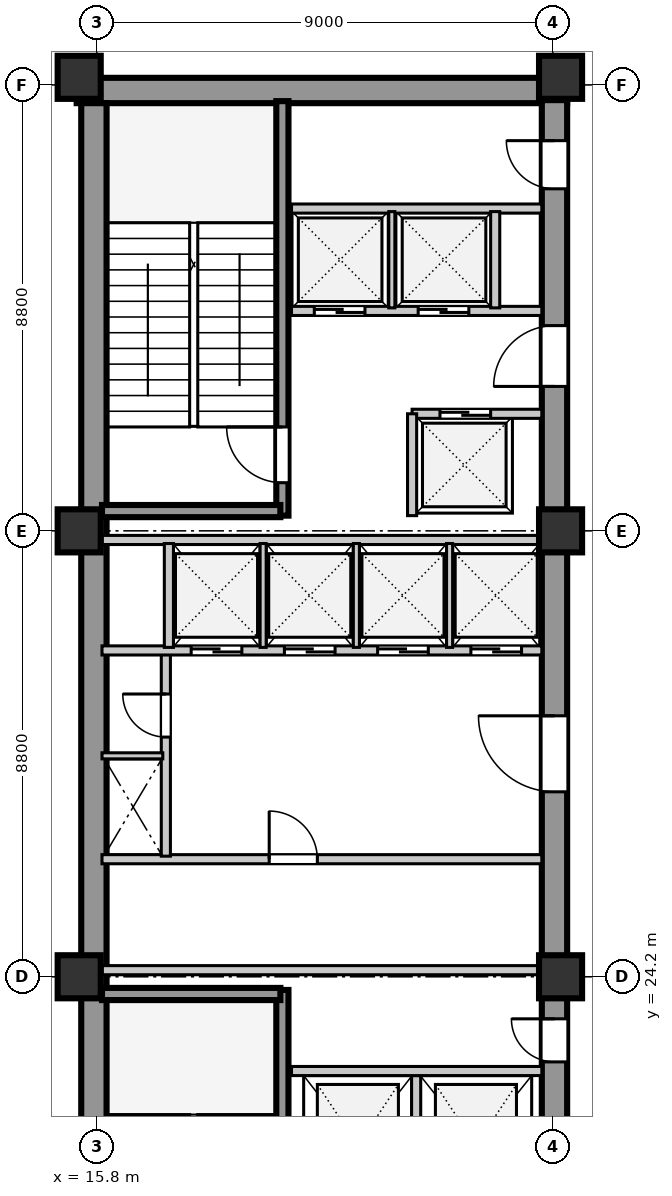
"""IFC4 building model, lengths in metres.
Left out: names, types, materials, properties, quantities, classifications, styles, units other than length and angle.
Written with IfcOpenShell. Run it as: python <this file> out.ifc"""

import sys

from ifc_helpers import new_model, si_unit, direction, frame, frame_2d, origin, origin_2d, place, context, subcontext, project, spatial, rectangle, extrude, element, fill, save


model = new_model("IFC4")
c1 = context("Model", 3, precision=1e-05, world=origin(), true_north=direction((0.0, 1.0)))
c2 = subcontext(c1, "Body", "Model", "MODEL_VIEW")
j1 = project(units=[si_unit("LENGTHUNIT", "METRE"), si_unit("PLANEANGLEUNIT", "RADIAN")], contexts=[c1])
p1 = place(None, origin())
s1 = spatial("IfcSite", under=j1, at=p1, CompositionType="ELEMENT")
p2 = place(p1, origin())
s2 = spatial("IfcBuilding", under=s1, at=p2, CompositionType="ELEMENT")
p3 = place(p2, frame((0.0, 0.0, 208.9)))
s3 = spatial("IfcBuildingStorey", under=s2, at=p3, CompositionType="ELEMENT", Elevation=208.9)
p4 = place(p3, frame((15.4, 41.69, 0.0), z_axis=(0.0, 0.0, 1.0), x_axis=(1.0, 0.0, 0.0)))
e1 = element("IfcWall", 1, at=p4, inside=s3, PredefinedType="SHEAR", context=c2, shape_type="SweptSolid", body=[
    extrude(rectangle(XDim=9.68, YDim=0.5, at=frame_2d((4.84, 0.0))), origin(), (0.0, 0.0, 1.0), 4.96),
])
p5 = place(p3, frame((15.74, 15.81, 0.0), z_axis=(0.0, 0.0, 1.0), x_axis=(0.0, 1.0, 0.0)))
e2 = element("IfcWall", 2, at=p5, inside=s3, PredefinedType="SHEAR", context=c2, shape_type="SweptSolid", body=[
    extrude(rectangle(XDim=25.63, YDim=0.5, at=frame_2d((12.815, 0.0))), origin(), (0.0, 0.0, 1.0), 4.96),
])
p6 = place(p3, frame((24.83, 15.74, 0.0), z_axis=(0.0, 0.0, 1.0), x_axis=(0.0, 1.0, 0.0)))
e3 = element("IfcWall", 3, at=p6, inside=s3, PredefinedType="SHEAR", context=c2, shape_type="SweptSolid", body=[
    extrude(rectangle(XDim=25.76, YDim=0.5, at=frame_2d((12.88, 0.0))), origin(), (0.0, 0.0, 1.0), 4.96),
])
p7 = place(p6, frame((1.61, 0.0, 0.0)))
e4 = element("IfcOpeningElement", 4, at=p7, cuts=e3, PredefinedType="OPENING", context=c2, shape_type="SweptSolid", body=[
    extrude(rectangle(XDim=1.2, YDim=2.1, at=frame_2d((0.6, 1.05))), frame((0.0, 0.26, 0.0), z_axis=(0.0, -1.0, 0.0), x_axis=(1.0, 0.0, 0.0)), (0.0, 0.0, 1.0), 0.52),
])
p8 = place(p6, frame((6.78, 0.0, 0.0)))
e5 = element("IfcOpeningElement", 5, at=p8, cuts=e3, PredefinedType="OPENING", context=c2, shape_type="SweptSolid", body=[
    extrude(rectangle(XDim=0.85, YDim=2.06, at=frame_2d((0.425, 1.03))), frame((0.0, 0.26, 0.0), z_axis=(0.0, -1.0, 0.0), x_axis=(1.0, 0.0, 0.0)), (0.0, 0.0, 1.0), 0.52),
])
p9 = place(p6, frame((12.11, 0.0, 0.0)))
e6 = element("IfcOpeningElement", 6, at=p9, cuts=e3, PredefinedType="OPENING", context=c2, shape_type="SweptSolid", body=[
    extrude(rectangle(XDim=1.5, YDim=2.12, at=frame_2d((0.75, 1.06))), frame((0.0, 0.26, 0.0), z_axis=(0.0, -1.0, 0.0), x_axis=(1.0, 0.0, 0.0)), (0.0, 0.0, 1.0), 0.52),
])
p10 = place(p6, frame((20.11, 0.0, 0.0)))
e7 = element("IfcOpeningElement", 7, at=p10, cuts=e3, PredefinedType="OPENING", context=c2, shape_type="SweptSolid", body=[
    extrude(rectangle(XDim=1.2, YDim=2.12, at=frame_2d((0.6, 1.06))), frame((0.0, 0.26, 0.0), z_axis=(0.0, -1.0, 0.0), x_axis=(1.0, 0.0, 0.0)), (0.0, 0.0, 1.0), 0.52),
])
p11 = place(p6, frame((24.01, 0.0, 0.0)))
e8 = element("IfcOpeningElement", 8, at=p11, cuts=e3, PredefinedType="OPENING", context=c2, shape_type="SweptSolid", body=[
    extrude(rectangle(XDim=0.95, YDim=2.1, at=frame_2d((0.475, 1.05))), frame((0.0, 0.26, 0.0), z_axis=(0.0, -1.0, 0.0), x_axis=(1.0, 0.0, 0.0)), (0.0, 0.0, 1.0), 0.52),
])
for number, where, z_axis, x_axis in (
    (9, (15.45, 24.2, 0.0), (0.0, 0.0, 1.0), (1.0, 0.0, 0.0)),
    (10, (15.45, 33.0, 0.0), (0.0, 0.0, 1.0), (1.0, 0.0, 0.0)),
    (11, (15.45, 41.95, 0.0), (0.0, 0.0, 1.0), (1.0, 0.0, 0.0)),
    (12, (24.95, 24.2, 0.0), (0.0, 0.0, 1.0), (1.0, 0.0, 0.0)),
    (13, (24.95, 33.0, 0.0), (0.0, 0.0, 1.0), (1.0, 0.0, 0.0)),
    (14, (24.95, 41.95, 0.0), (0.0, 0.0, 1.0), (1.0, 0.0, 0.0)),
):
    element("IfcColumn", number, at=place(p3, frame(where, z_axis=z_axis, x_axis=x_axis)), inside=s3, PredefinedType="COLUMN", context=c2, shape_type="SweptSolid", body=[
        extrude(rectangle(XDim=0.85, YDim=0.85, at=origin_2d()), origin(), (0.0, 0.0, 1.0), 4.96),
    ])
p12 = place(p3, frame((19.46, 15.74, 0.0), z_axis=(0.0, 0.0, 1.0), x_axis=(0.0, 1.0, 0.0)))
e15 = element("IfcWall", 15, at=p12, inside=s3, PredefinedType="SHEAR", context=c2, shape_type="SweptSolid", body=[
    extrude(rectangle(XDim=8.2, YDim=0.24, at=frame_2d((4.1, 0.0))), origin(), (0.0, 0.0, 1.0), 5.2),
])
p13 = place(p12, frame((0.45, 0.0, 0.0)))
e16 = element("IfcOpeningElement", 16, at=p13, cuts=e15, PredefinedType="OPENING", context=c2, shape_type="SweptSolid", body=[
    extrude(rectangle(XDim=1.1, YDim=2.1, at=frame_2d((0.55, 1.05))), frame((0.0, 0.13, 0.0), z_axis=(0.0, -1.0, 0.0), x_axis=(1.0, 0.0, 0.0)), (0.0, 0.0, 1.0), 0.26),
])
p14 = place(p3, frame((15.9, 23.86, 0.0), z_axis=(0.0, 0.0, 1.0), x_axis=(1.0, 0.0, 0.0)))
e17 = element("IfcWall", 17, at=p14, inside=s3, PredefinedType="SHEAR", context=c2, shape_type="SweptSolid", body=[
    extrude(rectangle(XDim=3.52, YDim=0.24, at=frame_2d((1.76, 0.0))), origin(), (0.0, 0.0, 1.0), 5.2),
])
p15 = place(p3, frame((22.1, 19.51, 0.0), z_axis=(0.0, 0.0, 1.0), x_axis=(0.0, 1.0, 0.0)))
e18 = element("IfcWall", 18, at=p15, inside=s3, PredefinedType="SOLIDWALL", context=c2, shape_type="SweptSolid", body=[
    extrude(rectangle(XDim=2.74, YDim=0.18, at=frame_2d((1.37, 0.0))), origin(), (0.0, 0.0, 1.0), 4.96),
])
p16 = place(p3, frame((19.64, 22.34, 0.0), z_axis=(0.0, 0.0, 1.0), x_axis=(1.0, 0.0, 0.0)))
e19 = element("IfcWall", 19, at=p16, inside=s3, PredefinedType="SOLIDWALL", context=c2, shape_type="SweptSolid", body=[
    extrude(rectangle(XDim=4.94, YDim=0.18, at=frame_2d((2.47, 0.0))), origin(), (0.0, 0.0, 1.0), 4.96),
])
p17 = place(p3, frame((15.9, 26.52, 0.0), z_axis=(0.0, 0.0, 1.0), x_axis=(1.0, 0.0, 0.0)))
e20 = element("IfcWall", 20, at=p17, inside=s3, PredefinedType="SOLIDWALL", context=c2, shape_type="SweptSolid", body=[
    extrude(rectangle(XDim=8.68, YDim=0.18, at=frame_2d((4.34, 0.0))), origin(), (0.0, 0.0, 1.0), 4.96),
])
p18 = place(p17, frame((3.3, 0.0, 0.0)))
e21 = element("IfcOpeningElement", 21, at=p18, cuts=e20, PredefinedType="OPENING", context=c2, shape_type="SweptSolid", body=[
    extrude(rectangle(XDim=0.95, YDim=2.1, at=frame_2d((0.475, 1.05))), frame((0.0, 0.1, 0.0), z_axis=(0.0, -1.0, 0.0), x_axis=(1.0, 0.0, 0.0)), (0.0, 0.0, 1.0), 0.2),
])
p19 = place(p3, frame((15.9, 24.33, 0.0), z_axis=(0.0, 0.0, 1.0), x_axis=(1.0, 0.0, 0.0)))
e22 = element("IfcWall", 22, at=p19, inside=s3, PredefinedType="SOLIDWALL", context=c2, shape_type="SweptSolid", body=[
    extrude(rectangle(XDim=8.68, YDim=0.18, at=frame_2d((4.34, 0.0))), origin(), (0.0, 0.0, 1.0), 4.31),
])
p20 = place(p3, frame((17.16, 26.58, 0.0), z_axis=(0.0, 0.0, 1.0), x_axis=(0.0, 1.0, 0.0)))
e23 = element("IfcWall", 23, at=p20, inside=s3, PredefinedType="SOLIDWALL", context=c2, shape_type="SweptSolid", body=[
    extrude(rectangle(XDim=4.02, YDim=0.18, at=frame_2d((2.01, 0.0))), origin(), (0.0, 0.0, 1.0), 4.96),
])
p21 = place(p20, frame((2.35, 0.0, 0.0)))
e24 = element("IfcOpeningElement", 24, at=p21, cuts=e23, PredefinedType="OPENING", context=c2, shape_type="SweptSolid", body=[
    extrude(rectangle(XDim=0.85, YDim=2.06, at=frame_2d((0.425, 1.03))), frame((0.0, 0.1, 0.0), z_axis=(0.0, -1.0, 0.0), x_axis=(1.0, 0.0, 0.0)), (0.0, 0.0, 1.0), 0.2),
])
p22 = place(p3, frame((15.9, 28.56, 0.0), z_axis=(0.0, 0.0, 1.0), x_axis=(1.0, 0.0, 0.0)))
e25 = element("IfcWall", 25, at=p22, inside=s3, PredefinedType="PARTITIONING", context=c2, shape_type="SweptSolid", body=[
    extrude(rectangle(XDim=1.2, YDim=0.12, at=frame_2d((0.6, 0.0))), origin(), (0.0, 0.0, 1.0), 4.96),
])
p23 = place(p3, frame((15.9, 30.64, 0.0), z_axis=(0.0, 0.0, 1.0), x_axis=(1.0, 0.0, 0.0)))
e26 = element("IfcWall", 26, at=p23, inside=s3, PredefinedType="SOLIDWALL", context=c2, shape_type="SweptSolid", body=[
    extrude(rectangle(XDim=8.68, YDim=0.18, at=frame_2d((4.34, 0.0))), origin(), (0.0, 0.0, 1.0), 4.96),
])
p24 = place(p23, frame((1.76, 0.0, 0.0)))
e27 = element("IfcOpeningElement", 27, at=p24, cuts=e26, PredefinedType="OPENING", context=c2, shape_type="SweptSolid", body=[
    extrude(rectangle(XDim=1.0, YDim=2.1, at=frame_2d((0.5, 1.05))), frame((0.0, 0.1, 0.0), z_axis=(0.0, -1.0, 0.0), x_axis=(1.0, 0.0, 0.0)), (0.0, 0.0, 1.0), 0.2),
])
p25 = place(p23, frame((3.6, 0.0, 0.0)))
e28 = element("IfcOpeningElement", 28, at=p25, cuts=e26, PredefinedType="OPENING", context=c2, shape_type="SweptSolid", body=[
    extrude(rectangle(XDim=1.0, YDim=2.1, at=frame_2d((0.5, 1.05))), frame((0.0, 0.1, 0.0), z_axis=(0.0, -1.0, 0.0), x_axis=(1.0, 0.0, 0.0)), (0.0, 0.0, 1.0), 0.2),
])
p26 = place(p23, frame((5.44, 0.0, 0.0)))
e29 = element("IfcOpeningElement", 29, at=p26, cuts=e26, PredefinedType="OPENING", context=c2, shape_type="SweptSolid", body=[
    extrude(rectangle(XDim=1.0, YDim=2.1, at=frame_2d((0.5, 1.05))), frame((0.0, 0.1, 0.0), z_axis=(0.0, -1.0, 0.0), x_axis=(1.0, 0.0, 0.0)), (0.0, 0.0, 1.0), 0.2),
])
p27 = place(p23, frame((7.28, 0.0, 0.0)))
e30 = element("IfcOpeningElement", 30, at=p27, cuts=e26, PredefinedType="OPENING", context=c2, shape_type="SweptSolid", body=[
    extrude(rectangle(XDim=1.0, YDim=2.1, at=frame_2d((0.5, 1.05))), frame((0.0, 0.1, 0.0), z_axis=(0.0, -1.0, 0.0), x_axis=(1.0, 0.0, 0.0)), (0.0, 0.0, 1.0), 0.2),
])
p28 = place(p3, frame((15.9, 32.82, 0.0), z_axis=(0.0, 0.0, 1.0), x_axis=(1.0, 0.0, 0.0)))
e31 = element("IfcWall", 31, at=p28, inside=s3, PredefinedType="SOLIDWALL", context=c2, shape_type="SweptSolid", body=[
    extrude(rectangle(XDim=8.68, YDim=0.18, at=frame_2d((4.34, 0.0))), origin(), (0.0, 0.0, 1.0), 4.31),
])
p29 = place(p3, frame((17.22, 30.7, 0.0), z_axis=(0.0, 0.0, 1.0), x_axis=(0.0, 1.0, 0.0)))
e32 = element("IfcWall", 32, at=p29, inside=s3, PredefinedType="SOLIDWALL", context=c2, shape_type="SweptSolid", body=[
    extrude(rectangle(XDim=2.05, YDim=0.18, at=frame_2d((1.025, 0.0))), origin(), (0.0, 0.0, 1.0), 4.96),
])
for number, where, z_axis, x_axis in (
    (33, (19.08, 30.7, 0.0), (0.0, 0.0, 1.0), (0.0, 1.0, 0.0)),
    (34, (20.92, 30.7, 0.0), (0.0, 0.0, 1.0), (0.0, 1.0, 0.0)),
    (35, (22.76, 30.7, 0.0), (0.0, 0.0, 1.0), (0.0, 1.0, 0.0)),
):
    element("IfcWall", number, at=place(p3, frame(where, z_axis=z_axis, x_axis=x_axis)), inside=s3, PredefinedType="PARTITIONING", context=c2, shape_type="SweptSolid", body=[
        extrude(rectangle(XDim=2.05, YDim=0.12, at=frame_2d((1.025, 0.0))), origin(), (0.0, 0.0, 1.0), 4.96),
    ])
p30 = place(p3, frame((19.46, 33.3, 0.0), z_axis=(0.0, 0.0, 1.0), x_axis=(0.0, 1.0, 0.0)))
e36 = element("IfcWall", 36, at=p30, inside=s3, PredefinedType="SHEAR", context=c2, shape_type="SweptSolid", body=[
    extrude(rectangle(XDim=8.18, YDim=0.24, at=frame_2d((4.09, 0.0))), origin(), (0.0, 0.0, 1.0), 5.2),
])
p31 = place(p30, frame((0.65, 0.0, 0.0)))
e37 = element("IfcOpeningElement", 37, at=p31, cuts=e36, PredefinedType="OPENING", context=c2, shape_type="SweptSolid", body=[
    extrude(rectangle(XDim=1.1, YDim=2.1, at=frame_2d((0.55, 1.05))), frame((0.0, 0.13, 0.0), z_axis=(0.0, -1.0, 0.0), x_axis=(1.0, 0.0, 0.0)), (0.0, 0.0, 1.0), 0.26),
])
p32 = place(p3, frame((15.9, 33.39, 0.0), z_axis=(0.0, 0.0, 1.0), x_axis=(1.0, 0.0, 0.0)))
e38 = element("IfcWall", 38, at=p32, inside=s3, PredefinedType="SHEAR", context=c2, shape_type="SweptSolid", body=[
    extrude(rectangle(XDim=3.52, YDim=0.24, at=frame_2d((1.76, 0.0))), origin(), (0.0, 0.0, 1.0), 5.2),
])
p33 = place(p3, frame((22.02, 35.31, 0.0), z_axis=(0.0, 0.0, 1.0), x_axis=(1.0, 0.0, 0.0)))
e39 = element("IfcWall", 39, at=p33, inside=s3, PredefinedType="SOLIDWALL", context=c2, shape_type="SweptSolid", body=[
    extrude(rectangle(XDim=2.56, YDim=0.18, at=frame_2d((1.28, 0.0))), origin(), (0.0, 0.0, 1.0), 4.96),
])
p34 = place(p33, frame((0.55, 0.0, 0.0)))
e40 = element("IfcOpeningElement", 40, at=p34, cuts=e39, PredefinedType="OPENING", context=c2, shape_type="SweptSolid", body=[
    extrude(rectangle(XDim=1.0, YDim=2.1, at=frame_2d((0.5, 1.05))), frame((0.0, 0.1, 0.0), z_axis=(0.0, -1.0, 0.0), x_axis=(1.0, 0.0, 0.0)), (0.0, 0.0, 1.0), 0.2),
])
p35 = place(p3, frame((22.02, 33.3, 0.0), z_axis=(0.0, 0.0, 1.0), x_axis=(0.0, 1.0, 0.0)))
e41 = element("IfcWall", 41, at=p35, inside=s3, PredefinedType="SOLIDWALL", context=c2, shape_type="SweptSolid", body=[
    extrude(rectangle(XDim=2.01, YDim=0.18, at=frame_2d((1.005, 0.0))), origin(), (0.0, 0.0, 1.0), 4.96),
])
p36 = place(p3, frame((19.64, 37.34, 0.0), z_axis=(0.0, 0.0, 1.0), x_axis=(1.0, 0.0, 0.0)))
e42 = element("IfcWall", 42, at=p36, inside=s3, PredefinedType="SOLIDWALL", context=c2, shape_type="SweptSolid", body=[
    extrude(rectangle(XDim=4.94, YDim=0.18, at=frame_2d((2.47, 0.0))), origin(), (0.0, 0.0, 1.0), 4.96),
])
p37 = place(p36, frame((0.45, 0.0, 0.0)))
e43 = element("IfcOpeningElement", 43, at=p37, cuts=e42, PredefinedType="OPENING", context=c2, shape_type="SweptSolid", body=[
    extrude(rectangle(XDim=1.0, YDim=2.1, at=frame_2d((0.5, 1.05))), frame((0.0, 0.1, 0.0), z_axis=(0.0, -1.0, 0.0), x_axis=(1.0, 0.0, 0.0)), (0.0, 0.0, 1.0), 0.2),
])
p38 = place(p36, frame((2.5, 0.0, 0.0)))
e44 = element("IfcOpeningElement", 44, at=p38, cuts=e42, PredefinedType="OPENING", context=c2, shape_type="SweptSolid", body=[
    extrude(rectangle(XDim=1.0, YDim=2.1, at=frame_2d((0.5, 1.05))), frame((0.0, 0.1, 0.0), z_axis=(0.0, -1.0, 0.0), x_axis=(1.0, 0.0, 0.0)), (0.0, 0.0, 1.0), 0.2),
])
p39 = place(p3, frame((19.64, 39.36, 0.0), z_axis=(0.0, 0.0, 1.0), x_axis=(1.0, 0.0, 0.0)))
e45 = element("IfcWall", 45, at=p39, inside=s3, PredefinedType="SOLIDWALL", context=c2, shape_type="SweptSolid", body=[
    extrude(rectangle(XDim=4.94, YDim=0.18, at=frame_2d((2.47, 0.0))), origin(), (0.0, 0.0, 1.0), 4.96),
])
p40 = place(p3, frame((21.62, 37.4, 0.0), z_axis=(0.0, 0.0, 1.0), x_axis=(0.0, 1.0, 0.0)))
e46 = element("IfcWall", 46, at=p40, inside=s3, PredefinedType="PARTITIONING", context=c2, shape_type="SweptSolid", body=[
    extrude(rectangle(XDim=1.9, YDim=0.12, at=frame_2d((0.95, 0.0))), origin(), (0.0, 0.0, 1.0), 4.96),
])
p41 = place(p3, frame((23.66, 37.4, 0.0), z_axis=(0.0, 0.0, 1.0), x_axis=(0.0, 1.0, 0.0)))
e47 = element("IfcWall", 47, at=p41, inside=s3, PredefinedType="SOLIDWALL", context=c2, shape_type="SweptSolid", body=[
    extrude(rectangle(XDim=1.9, YDim=0.18, at=frame_2d((0.95, 0.0))), origin(), (0.0, 0.0, 1.0), 4.96),
])
p42 = place(p8, frame((0.85, 0.0, 0.0), z_axis=(0.0, 0.0, 1.0), x_axis=(-1.0, 0.0, 0.0)))
e48 = element("IfcDoor", 48, at=p42, inside=s3, OperationType="SINGLE_SWING_LEFT", PredefinedType="DOOR", context=c2, shape_type="SweptSolid", body=[
    extrude(rectangle(XDim=0.85, YDim=2.06, at=frame_2d((0.425, 1.03))), frame((0.0, 0.025, 0.0), z_axis=(0.0, -1.0, 0.0), x_axis=(1.0, 0.0, 0.0)), (0.0, 0.0, 1.0), 0.05),
])
fill(e5, e48)
p43 = place(p18, origin())
e49 = element("IfcDoor", 49, at=p43, inside=s3, OperationType="SINGLE_SWING_LEFT", PredefinedType="DOOR", context=c2, shape_type="SweptSolid", body=[
    extrude(rectangle(XDim=0.95, YDim=2.1, at=frame_2d((0.475, 1.05))), frame((0.0, 0.025, 0.0), z_axis=(0.0, -1.0, 0.0), x_axis=(1.0, 0.0, 0.0)), (0.0, 0.0, 1.0), 0.05),
])
fill(e21, e49)
p44 = place(p21, origin())
e50 = element("IfcDoor", 50, at=p44, inside=s3, OperationType="SINGLE_SWING_RIGHT", PredefinedType="DOOR", context=c2, shape_type="SweptSolid", body=[
    extrude(rectangle(XDim=0.85, YDim=2.06, at=frame_2d((0.425, 1.03))), frame((0.0, 0.025, 0.0), z_axis=(0.0, -1.0, 0.0), x_axis=(1.0, 0.0, 0.0)), (0.0, 0.0, 1.0), 0.05),
])
fill(e24, e50)
p45 = place(p9, frame((1.5, 0.0, 0.0), z_axis=(0.0, 0.0, 1.0), x_axis=(-1.0, 0.0, 0.0)))
e51 = element("IfcDoor", 51, at=p45, inside=s3, OperationType="SINGLE_SWING_LEFT", PredefinedType="DOOR", context=c2, shape_type="SweptSolid", body=[
    extrude(rectangle(XDim=1.5, YDim=2.12, at=frame_2d((0.75, 1.06))), frame((0.0, 0.025, 0.0), z_axis=(0.0, -1.0, 0.0), x_axis=(1.0, 0.0, 0.0)), (0.0, 0.0, 1.0), 0.05),
])
fill(e6, e51)
p46 = place(p24, frame((1.0, 0.0, 0.0), z_axis=(0.0, 0.0, 1.0), x_axis=(-1.0, 0.0, 0.0)))
e52 = element("IfcDoor", 52, at=p46, inside=s3, OperationType="DOUBLE_DOOR_SLIDING", PredefinedType="DOOR", context=c2, shape_type="SweptSolid", body=[
    extrude(rectangle(XDim=1.0, YDim=2.1, at=frame_2d((0.5, 1.05))), frame((0.0, 0.025, 0.0), z_axis=(0.0, -1.0, 0.0), x_axis=(1.0, 0.0, 0.0)), (0.0, 0.0, 1.0), 0.05),
])
fill(e27, e52)
p47 = place(p25, frame((1.0, 0.0, 0.0), z_axis=(0.0, 0.0, 1.0), x_axis=(-1.0, 0.0, 0.0)))
e53 = element("IfcDoor", 53, at=p47, inside=s3, OperationType="DOUBLE_DOOR_SLIDING", PredefinedType="DOOR", context=c2, shape_type="SweptSolid", body=[
    extrude(rectangle(XDim=1.0, YDim=2.1, at=frame_2d((0.5, 1.05))), frame((0.0, 0.025, 0.0), z_axis=(0.0, -1.0, 0.0), x_axis=(1.0, 0.0, 0.0)), (0.0, 0.0, 1.0), 0.05),
])
fill(e28, e53)
p48 = place(p26, frame((1.0, 0.0, 0.0), z_axis=(0.0, 0.0, 1.0), x_axis=(-1.0, 0.0, 0.0)))
e54 = element("IfcDoor", 54, at=p48, inside=s3, OperationType="DOUBLE_DOOR_SLIDING", PredefinedType="DOOR", context=c2, shape_type="SweptSolid", body=[
    extrude(rectangle(XDim=1.0, YDim=2.1, at=frame_2d((0.5, 1.05))), frame((0.0, 0.025, 0.0), z_axis=(0.0, -1.0, 0.0), x_axis=(1.0, 0.0, 0.0)), (0.0, 0.0, 1.0), 0.05),
])
fill(e29, e54)
p49 = place(p27, frame((1.0, 0.0, 0.0), z_axis=(0.0, 0.0, 1.0), x_axis=(-1.0, 0.0, 0.0)))
e55 = element("IfcDoor", 55, at=p49, inside=s3, OperationType="DOUBLE_DOOR_SLIDING", PredefinedType="DOOR", context=c2, shape_type="SweptSolid", body=[
    extrude(rectangle(XDim=1.0, YDim=2.1, at=frame_2d((0.5, 1.05))), frame((0.0, 0.025, 0.0), z_axis=(0.0, -1.0, 0.0), x_axis=(1.0, 0.0, 0.0)), (0.0, 0.0, 1.0), 0.05),
])
fill(e30, e55)
p50 = place(p31, origin())
e56 = element("IfcDoor", 56, at=p50, inside=s3, OperationType="SINGLE_SWING_RIGHT", PredefinedType="DOOR", context=c2, shape_type="SweptSolid", body=[
    extrude(rectangle(XDim=1.1, YDim=2.1, at=frame_2d((0.55, 1.05))), frame((0.0, 0.025, 0.0), z_axis=(0.0, -1.0, 0.0), x_axis=(1.0, 0.0, 0.0)), (0.0, 0.0, 1.0), 0.05),
])
fill(e37, e56)
p51 = place(p10, frame((1.2, 0.0, 0.0), z_axis=(0.0, 0.0, 1.0), x_axis=(-1.0, 0.0, 0.0)))
e57 = element("IfcDoor", 57, at=p51, inside=s3, OperationType="SINGLE_SWING_RIGHT", PredefinedType="DOOR", context=c2, shape_type="SweptSolid", body=[
    extrude(rectangle(XDim=1.2, YDim=2.12, at=frame_2d((0.6, 1.06))), frame((0.0, 0.025, 0.0), z_axis=(0.0, -1.0, 0.0), x_axis=(1.0, 0.0, 0.0)), (0.0, 0.0, 1.0), 0.05),
])
fill(e7, e57)
p52 = place(p37, frame((1.0, 0.0, 0.0), z_axis=(0.0, 0.0, 1.0), x_axis=(-1.0, 0.0, 0.0)))
e58 = element("IfcDoor", 58, at=p52, inside=s3, OperationType="DOUBLE_DOOR_SLIDING", PredefinedType="DOOR", context=c2, shape_type="SweptSolid", body=[
    extrude(rectangle(XDim=1.0, YDim=2.1, at=frame_2d((0.5, 1.05))), frame((0.0, 0.025, 0.0), z_axis=(0.0, -1.0, 0.0), x_axis=(1.0, 0.0, 0.0)), (0.0, 0.0, 1.0), 0.05),
])
fill(e43, e58)
p53 = place(p38, frame((1.0, 0.0, 0.0), z_axis=(0.0, 0.0, 1.0), x_axis=(-1.0, 0.0, 0.0)))
e59 = element("IfcDoor", 59, at=p53, inside=s3, OperationType="DOUBLE_DOOR_SLIDING", PredefinedType="DOOR", context=c2, shape_type="SweptSolid", body=[
    extrude(rectangle(XDim=1.0, YDim=2.1, at=frame_2d((0.5, 1.05))), frame((0.0, 0.025, 0.0), z_axis=(0.0, -1.0, 0.0), x_axis=(1.0, 0.0, 0.0)), (0.0, 0.0, 1.0), 0.05),
])
fill(e44, e59)
p54 = place(p34, origin())
e60 = element("IfcDoor", 60, at=p54, inside=s3, OperationType="DOUBLE_DOOR_SLIDING", PredefinedType="DOOR", context=c2, shape_type="SweptSolid", body=[
    extrude(rectangle(XDim=1.0, YDim=2.1, at=frame_2d((0.5, 1.05))), frame((0.0, 0.025, 0.0), z_axis=(0.0, -1.0, 0.0), x_axis=(1.0, 0.0, 0.0)), (0.0, 0.0, 1.0), 0.05),
])
fill(e40, e60)
p55 = place(p11, frame((0.95, 0.0, 0.0), z_axis=(0.0, 0.0, 1.0), x_axis=(-1.0, 0.0, 0.0)))
e61 = element("IfcDoor", 61, at=p55, inside=s3, OperationType="SINGLE_SWING_LEFT", PredefinedType="DOOR", context=c2, shape_type="SweptSolid", body=[
    extrude(rectangle(XDim=0.95, YDim=2.1, at=frame_2d((0.475, 1.05))), frame((0.0, 0.025, 0.0), z_axis=(0.0, -1.0, 0.0), x_axis=(1.0, 0.0, 0.0)), (0.0, 0.0, 1.0), 0.05),
])
fill(e8, e61)
save(model, sys.argv[1])
